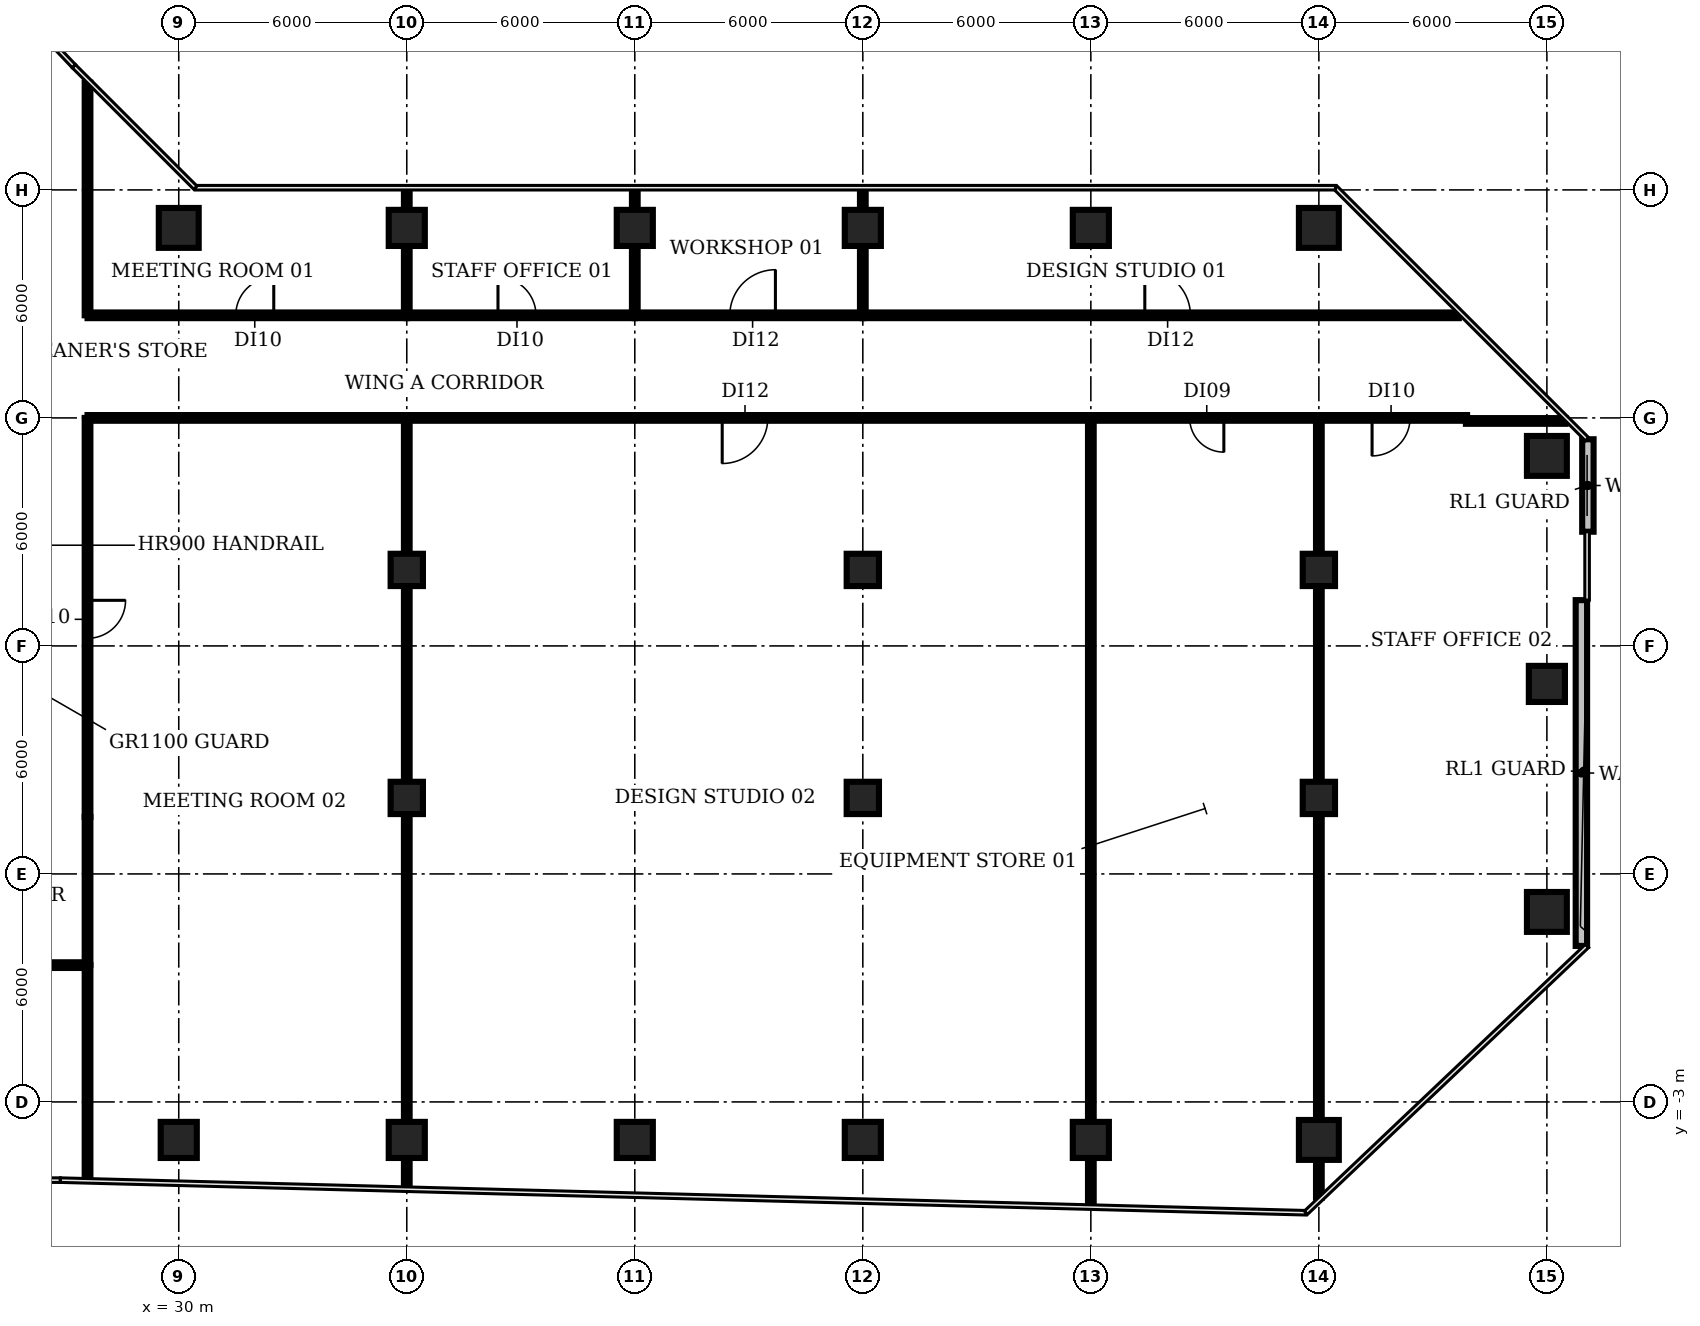
"""IFC4 building model, lengths in metres.
Left out: names, types, materials, properties, quantities, classifications, styles, units other than length and angle.
Written with IfcOpenShell. Run it as: python <this file> out.ifc"""

import sys

from ifc_helpers import new_model, si_unit, direction, frame, frame_2d, origin, origin_2d, place, context, subcontext, project, spatial, rectangle, circle, extrude, element, fill, save


model = new_model("IFC4")
c1 = context("Model", 3, precision=1e-05, world=origin(), true_north=direction((0.0, 1.0)))
c2 = subcontext(c1, "Body", "Model", "MODEL_VIEW")
j1 = project(units=[si_unit("LENGTHUNIT", "METRE"), si_unit("PLANEANGLEUNIT", "RADIAN")], contexts=[c1])
p1 = place(None, origin())
s1 = spatial("IfcSite", under=j1, at=p1, CompositionType="ELEMENT")
p2 = place(p1, origin())
s2 = spatial("IfcBuilding", under=s1, at=p2, CompositionType="ELEMENT")
p3 = place(p2, frame((0.0, 0.0, 45.8)))
s3 = spatial("IfcBuildingStorey", under=s2, at=p3, CompositionType="ELEMENT", Elevation=45.8)
p4 = place(p3, frame((30.0, -4.0, 0.0), z_axis=(0.0, 0.0, 1.0), x_axis=(1.0, 0.0, 0.0)))
e1 = element("IfcColumn", 1, at=p4, inside=s3, PredefinedType="COLUMN", context=c2, shape_type="SweptSolid", body=[
    extrude(rectangle(XDim=0.95, YDim=0.95, at=origin_2d()), origin(), (0.0, 0.0, 1.0), 3.85),
])
p5 = place(p3, frame((30.0, 20.0, 0.0), z_axis=(0.0, 0.0, 1.0), x_axis=(1.0, 0.0, 0.0)))
e2 = element("IfcColumn", 2, at=p5, inside=s3, PredefinedType="COLUMN", context=c2, shape_type="SweptSolid", body=[
    extrude(circle(Radius=0.525, at=origin_2d()), origin(), (0.0, 0.0, 1.0), 3.85),
])
p6 = place(p3, frame((36.0, -4.0, 0.0), z_axis=(0.0, 0.0, 1.0), x_axis=(1.0, 0.0, 0.0)))
e3 = element("IfcColumn", 3, at=p6, inside=s3, PredefinedType="COLUMN", context=c2, shape_type="SweptSolid", body=[
    extrude(rectangle(XDim=0.95, YDim=0.95, at=origin_2d()), origin(), (0.0, 0.0, 1.0), 3.85),
])
for number, where, z_axis, x_axis in (
    (4, (36.0, 5.0, 0.0), (0.0, 0.0, 1.0), (1.0, 0.0, 0.0)),
    (5, (36.0, 11.0, 0.0), (0.0, 0.0, 1.0), (1.0, 0.0, 0.0)),
):
    element("IfcColumn", number, at=place(p3, frame(where, z_axis=z_axis, x_axis=x_axis)), inside=s3, PredefinedType="COLUMN", context=c2, shape_type="SweptSolid", body=[
        extrude(rectangle(XDim=0.85, YDim=0.85, at=origin_2d()), origin(), (0.0, 0.0, 1.0), 3.85),
    ])
for number, where, z_axis, x_axis in (
    (6, (36.0, 20.0, 0.0), (0.0, 0.0, 1.0), (1.0, 0.0, 0.0)),
    (7, (42.0, -4.0, 0.0), (0.0, 0.0, 1.0), (1.0, 0.0, 0.0)),
    (8, (42.0, 20.0, 0.0), (0.0, 0.0, 1.0), (1.0, 0.0, 0.0)),
    (9, (48.0, -4.0, 0.0), (0.0, 0.0, 1.0), (1.0, 0.0, 0.0)),
):
    element("IfcColumn", number, at=place(p3, frame(where, z_axis=z_axis, x_axis=x_axis)), inside=s3, PredefinedType="COLUMN", context=c2, shape_type="SweptSolid", body=[
        extrude(rectangle(XDim=0.95, YDim=0.95, at=origin_2d()), origin(), (0.0, 0.0, 1.0), 3.85),
    ])
for number, where, z_axis, x_axis in (
    (10, (48.0, 5.0, 0.0), (0.0, 0.0, 1.0), (1.0, 0.0, 0.0)),
    (11, (48.0, 11.0, 0.0), (0.0, 0.0, 1.0), (1.0, 0.0, 0.0)),
):
    element("IfcColumn", number, at=place(p3, frame(where, z_axis=z_axis, x_axis=x_axis)), inside=s3, PredefinedType="COLUMN", context=c2, shape_type="SweptSolid", body=[
        extrude(rectangle(XDim=0.85, YDim=0.85, at=origin_2d()), origin(), (0.0, 0.0, 1.0), 3.85),
    ])
for number, where, z_axis, x_axis in (
    (12, (48.0, 20.0, 0.0), (0.0, 0.0, 1.0), (1.0, 0.0, 0.0)),
    (13, (54.0, -4.0, 0.0), (0.0, 0.0, 1.0), (1.0, 0.0, 0.0)),
    (14, (54.0, 20.0, 0.0), (0.0, 0.0, 1.0), (1.0, 0.0, 0.0)),
):
    element("IfcColumn", number, at=place(p3, frame(where, z_axis=z_axis, x_axis=x_axis)), inside=s3, PredefinedType="COLUMN", context=c2, shape_type="SweptSolid", body=[
        extrude(rectangle(XDim=0.95, YDim=0.95, at=origin_2d()), origin(), (0.0, 0.0, 1.0), 3.85),
    ])
p7 = place(p3, frame((60.0, -4.0, 0.0), z_axis=(0.0, 0.0, 1.0), x_axis=(1.0, 0.0, 0.0)))
e15 = element("IfcColumn", 15, at=p7, inside=s3, PredefinedType="COLUMN", context=c2, shape_type="SweptSolid", body=[
    extrude(circle(Radius=0.525, at=origin_2d()), origin(), (0.0, 0.0, 1.0), 3.85),
])
for number, where, z_axis, x_axis in (
    (16, (60.0, 5.0, 0.0), (0.0, 0.0, 1.0), (1.0, 0.0, 0.0)),
    (17, (60.0, 11.0, 0.0), (0.0, 0.0, 1.0), (1.0, 0.0, 0.0)),
):
    element("IfcColumn", number, at=place(p3, frame(where, z_axis=z_axis, x_axis=x_axis)), inside=s3, PredefinedType="COLUMN", context=c2, shape_type="SweptSolid", body=[
        extrude(rectangle(XDim=0.85, YDim=0.85, at=origin_2d()), origin(), (0.0, 0.0, 1.0), 3.85),
    ])
for number, where, z_axis, x_axis in (
    (18, (60.0, 20.0, 0.0), (0.0, 0.0, 1.0), (1.0, 0.0, 0.0)),
    (19, (66.0, 2.0, 0.0), (0.0, 0.0, 1.0), (1.0, 0.0, 0.0)),
):
    element("IfcColumn", number, at=place(p3, frame(where, z_axis=z_axis, x_axis=x_axis)), inside=s3, PredefinedType="COLUMN", context=c2, shape_type="SweptSolid", body=[
        extrude(circle(Radius=0.525, at=origin_2d()), origin(), (0.0, 0.0, 1.0), 3.85),
    ])
p8 = place(p3, frame((66.0, 8.0, 0.0), z_axis=(0.0, 0.0, 1.0), x_axis=(1.0, 0.0, 0.0)))
e20 = element("IfcColumn", 20, at=p8, inside=s3, PredefinedType="COLUMN", context=c2, shape_type="SweptSolid", body=[
    extrude(rectangle(XDim=0.95, YDim=0.95, at=origin_2d()), origin(), (0.0, 0.0, 1.0), 3.85),
])
p9 = place(p3, frame((66.0, 14.0, 0.0), z_axis=(0.0, 0.0, 1.0), x_axis=(1.0, 0.0, 0.0)))
e21 = element("IfcColumn", 21, at=p9, inside=s3, PredefinedType="COLUMN", context=c2, shape_type="SweptSolid", body=[
    extrude(circle(Radius=0.525, at=origin_2d()), origin(), (0.0, 0.0, 1.0), 3.85),
])
p10 = place(p3, frame((66.908, 1.105, 0.0), z_axis=(0.0, 0.0, 1.0), x_axis=(0.0, 1.0, 0.0)))
e22 = element("IfcWall", 22, at=p10, inside=s3, PredefinedType="SOLIDWALL", context=c2, shape_type="SweptSolid", body=[
    extrude(rectangle(XDim=9.1, YDim=0.3, at=frame_2d((4.55, 0.0))), origin(), (0.0, 0.0, 1.0), 3.85),
])
p11 = place(p3, frame((67.079, 12.005, 0.0), z_axis=(0.0, 0.0, 1.0), x_axis=(0.0, 1.0, 0.0)))
e23 = element("IfcWall", 23, at=p11, inside=s3, PredefinedType="SOLIDWALL", context=c2, shape_type="SweptSolid", body=[
    extrude(rectangle(XDim=2.433, YDim=0.3, at=frame_2d((1.217, 0.0))), origin(), (0.0, 0.0, 1.0), 3.85),
])
p12 = place(p3, frame((27.6, -5.01, 0.0), z_axis=(0.0, 0.0, 1.0), x_axis=(0.0, 1.0, 0.0)))
e24 = element("IfcWall", 24, at=p12, inside=s3, PredefinedType="PARTITIONING", context=c2, shape_type="SweptSolid", body=[
    extrude(rectangle(XDim=5.61, YDim=0.15, at=frame_2d((2.805, 0.0))), origin(), (0.0, 0.0, 1.0), 2.83),
])
p13 = place(p3, frame((27.6, 0.6, 0.0), z_axis=(0.0, 0.0, 1.0), x_axis=(-1.0, 0.0, 0.0)))
e25 = element("IfcWall", 25, at=p13, inside=s3, PredefinedType="PARTITIONING", context=c2, shape_type="SweptSolid", body=[
    extrude(rectangle(XDim=25.2, YDim=0.15, at=frame_2d((12.6, 0.0))), origin(), (0.0, 0.0, 1.0), 2.83),
])
p14 = place(p13, frame((12.1, 0.0, 0.0)))
e26 = element("IfcOpeningElement", 26, at=p14, cuts=e25, PredefinedType="OPENING", context=c2, shape_type="SweptSolid", body=[
    extrude(rectangle(XDim=1.2, YDim=2.1, at=frame_2d((0.6, 1.05))), frame((0.0, 0.085, 0.0), z_axis=(0.0, -1.0, 0.0), x_axis=(1.0, 0.0, 0.0)), (0.0, 0.0, 1.0), 0.17),
])
p15 = place(p3, frame((27.6, 0.6, 0.0), z_axis=(0.0, 0.0, 1.0), x_axis=(0.0, 1.0, 0.0)))
e27 = element("IfcWall", 27, at=p15, inside=s3, PredefinedType="PARTITIONING", context=c2, shape_type="SweptSolid", body=[
    extrude(rectangle(XDim=3.9, YDim=0.15, at=frame_2d((1.95, 0.0))), origin(), (0.0, 0.0, 1.0), 2.83),
])
p16 = place(p3, frame((27.6, 15.0, 0.0), z_axis=(0.0, 0.0, 1.0), x_axis=(0.0, -1.0, 0.0)))
e28 = element("IfcWall", 28, at=p16, inside=s3, PredefinedType="PARTITIONING", context=c2, shape_type="SweptSolid", body=[
    extrude(rectangle(XDim=10.5, YDim=0.15, at=frame_2d((5.25, 0.0))), origin(), (0.0, 0.0, 1.0), 2.83),
])
p17 = place(p16, frame((4.8, 0.0, 0.0)))
e29 = element("IfcOpeningElement", 29, at=p17, cuts=e28, PredefinedType="OPENING", context=c2, shape_type="SweptSolid", body=[
    extrude(rectangle(XDim=1.0, YDim=2.1, at=frame_2d((0.5, 1.05))), frame((0.0, 0.085, 0.0), z_axis=(0.0, -1.0, 0.0), x_axis=(1.0, 0.0, 0.0)), (0.0, 0.0, 1.0), 0.17),
])
p18 = place(p3, frame((27.6, 15.0, 0.0), z_axis=(0.0, 0.0, 1.0), x_axis=(1.0, 0.0, 0.0)))
e30 = element("IfcWall", 30, at=p18, inside=s3, PredefinedType="PARTITIONING", context=c2, shape_type="SweptSolid", body=[
    extrude(rectangle(XDim=8.4, YDim=0.15, at=frame_2d((4.2, 0.0))), origin(), (0.0, 0.0, 1.0), 2.83),
])
p19 = place(p3, frame((27.6, 17.7, 0.0), z_axis=(0.0, 0.0, 1.0), x_axis=(0.0, 1.0, 0.0)))
e31 = element("IfcWall", 31, at=p19, inside=s3, PredefinedType="PARTITIONING", context=c2, shape_type="SweptSolid", body=[
    extrude(rectangle(XDim=6.12, YDim=0.15, at=frame_2d((3.06, 0.0))), origin(), (0.0, 0.0, 1.0), 2.83),
])
p20 = place(p3, frame((27.6, 17.7, 0.0), z_axis=(0.0, 0.0, 1.0), x_axis=(1.0, 0.0, 0.0)))
e32 = element("IfcWall", 32, at=p20, inside=s3, PredefinedType="PARTITIONING", context=c2, shape_type="SweptSolid", body=[
    extrude(rectangle(XDim=8.4, YDim=0.15, at=frame_2d((4.2, 0.0))), origin(), (0.0, 0.0, 1.0), 2.83),
])
p21 = place(p20, frame((3.9, 0.0, 0.0)))
e33 = element("IfcOpeningElement", 33, at=p21, cuts=e32, PredefinedType="OPENING", context=c2, shape_type="SweptSolid", body=[
    extrude(rectangle(XDim=1.0, YDim=2.1, at=frame_2d((0.5, 1.05))), frame((0.0, 0.085, 0.0), z_axis=(0.0, -1.0, 0.0), x_axis=(1.0, 0.0, 0.0)), (0.0, 0.0, 1.0), 0.17),
])
p22 = place(p3, frame((36.0, -5.25, 0.0), z_axis=(0.0, 0.0, 1.0), x_axis=(0.0, 1.0, 0.0)))
e34 = element("IfcWall", 34, at=p22, inside=s3, PredefinedType="PARTITIONING", context=c2, shape_type="SweptSolid", body=[
    extrude(rectangle(XDim=20.25, YDim=0.15, at=frame_2d((10.125, 0.0))), origin(), (0.0, 0.0, 1.0), 2.83),
])
p23 = place(p3, frame((36.0, 17.7, 0.0), z_axis=(0.0, 0.0, 1.0), x_axis=(0.0, 1.0, 0.0)))
e35 = element("IfcWall", 35, at=p23, inside=s3, PredefinedType="PARTITIONING", context=c2, shape_type="SweptSolid", body=[
    extrude(rectangle(XDim=3.31, YDim=0.15, at=frame_2d((1.655, 0.0))), origin(), (0.0, 0.0, 1.0), 2.83),
])
p24 = place(p3, frame((36.0, 17.7, 0.0), z_axis=(0.0, 0.0, 1.0), x_axis=(1.0, 0.0, 0.0)))
e36 = element("IfcWall", 36, at=p24, inside=s3, PredefinedType="PARTITIONING", context=c2, shape_type="SweptSolid", body=[
    extrude(rectangle(XDim=6.0, YDim=0.15, at=frame_2d((3.0, 0.0))), origin(), (0.0, 0.0, 1.0), 2.83),
])
p25 = place(p24, frame((2.4, 0.0, 0.0)))
e37 = element("IfcOpeningElement", 37, at=p25, cuts=e36, PredefinedType="OPENING", context=c2, shape_type="SweptSolid", body=[
    extrude(rectangle(XDim=1.0, YDim=2.1, at=frame_2d((0.5, 1.05))), frame((0.0, 0.085, 0.0), z_axis=(0.0, -1.0, 0.0), x_axis=(1.0, 0.0, 0.0)), (0.0, 0.0, 1.0), 0.17),
])
p26 = place(p3, frame((42.0, 17.7, 0.0), z_axis=(0.0, 0.0, 1.0), x_axis=(0.0, 1.0, 0.0)))
e38 = element("IfcWall", 38, at=p26, inside=s3, PredefinedType="PARTITIONING", context=c2, shape_type="SweptSolid", body=[
    extrude(rectangle(XDim=3.31, YDim=0.15, at=frame_2d((1.655, 0.0))), origin(), (0.0, 0.0, 1.0), 2.83),
])
p27 = place(p3, frame((42.0, 17.7, 0.0), z_axis=(0.0, 0.0, 1.0), x_axis=(1.0, 0.0, 0.0)))
e39 = element("IfcWall", 39, at=p27, inside=s3, PredefinedType="PARTITIONING", context=c2, shape_type="SweptSolid", body=[
    extrude(rectangle(XDim=6.0, YDim=0.15, at=frame_2d((3.0, 0.0))), origin(), (0.0, 0.0, 1.0), 2.83),
])
p28 = place(p27, frame((2.5, 0.0, 0.0)))
e40 = element("IfcOpeningElement", 40, at=p28, cuts=e39, PredefinedType="OPENING", context=c2, shape_type="SweptSolid", body=[
    extrude(rectangle(XDim=1.2, YDim=2.1, at=frame_2d((0.6, 1.05))), frame((0.0, 0.085, 0.0), z_axis=(0.0, -1.0, 0.0), x_axis=(1.0, 0.0, 0.0)), (0.0, 0.0, 1.0), 0.17),
])
p29 = place(p3, frame((48.0, 17.7, 0.0), z_axis=(0.0, 0.0, 1.0), x_axis=(0.0, 1.0, 0.0)))
e41 = element("IfcWall", 41, at=p29, inside=s3, PredefinedType="PARTITIONING", context=c2, shape_type="SweptSolid", body=[
    extrude(rectangle(XDim=3.31, YDim=0.15, at=frame_2d((1.655, 0.0))), origin(), (0.0, 0.0, 1.0), 2.83),
])
p30 = place(p3, frame((48.0, 17.7, 0.0), z_axis=(0.0, 0.0, 1.0), x_axis=(1.0, 0.0, 0.0)))
e42 = element("IfcWall", 42, at=p30, inside=s3, PredefinedType="PARTITIONING", context=c2, shape_type="SweptSolid", body=[
    extrude(rectangle(XDim=15.683, YDim=0.15, at=frame_2d((7.842, 0.0))), origin(), (0.0, 0.0, 1.0), 2.83),
])
p31 = place(p30, frame((7.42, 0.0, 0.0)))
e43 = element("IfcOpeningElement", 43, at=p31, cuts=e42, PredefinedType="OPENING", context=c2, shape_type="SweptSolid", body=[
    extrude(rectangle(XDim=1.2, YDim=2.1, at=frame_2d((0.6, 1.05))), frame((0.0, 0.085, 0.0), z_axis=(0.0, -1.0, 0.0), x_axis=(1.0, 0.0, 0.0)), (0.0, 0.0, 1.0), 0.17),
])
p32 = place(p3, frame((54.0, -5.72, 0.0), z_axis=(0.0, 0.0, 1.0), x_axis=(0.0, 1.0, 0.0)))
e44 = element("IfcWall", 44, at=p32, inside=s3, PredefinedType="PARTITIONING", context=c2, shape_type="SweptSolid", body=[
    extrude(rectangle(XDim=20.72, YDim=0.15, at=frame_2d((10.36, 0.0))), origin(), (0.0, 0.0, 1.0), 2.83),
])
p33 = place(p3, frame((54.0, 15.0, 0.0), z_axis=(0.0, 0.0, 1.0), x_axis=(-1.0, 0.0, 0.0)))
e45 = element("IfcWall", 45, at=p33, inside=s3, PredefinedType="PARTITIONING", context=c2, shape_type="SweptSolid", body=[
    extrude(rectangle(XDim=18.0, YDim=0.15, at=frame_2d((9.0, 0.0))), origin(), (0.0, 0.0, 1.0), 2.83),
])
p34 = place(p33, frame((8.5, 0.0, 0.0)))
e46 = element("IfcOpeningElement", 46, at=p34, cuts=e45, PredefinedType="OPENING", context=c2, shape_type="SweptSolid", body=[
    extrude(rectangle(XDim=1.2, YDim=2.1, at=frame_2d((0.6, 1.05))), frame((0.0, 0.085, 0.0), z_axis=(0.0, -1.0, 0.0), x_axis=(1.0, 0.0, 0.0)), (0.0, 0.0, 1.0), 0.17),
])
p35 = place(p3, frame((60.0, -5.52, 0.0), z_axis=(0.0, 0.0, 1.0), x_axis=(0.0, 1.0, 0.0)))
e47 = element("IfcWall", 47, at=p35, inside=s3, PredefinedType="PARTITIONING", context=c2, shape_type="SweptSolid", body=[
    extrude(rectangle(XDim=20.52, YDim=0.15, at=frame_2d((10.26, 0.0))), origin(), (0.0, 0.0, 1.0), 2.83),
])
p36 = place(p3, frame((60.0, 15.0, 0.0), z_axis=(0.0, 0.0, 1.0), x_axis=(-1.0, 0.0, 0.0)))
e48 = element("IfcWall", 48, at=p36, inside=s3, PredefinedType="PARTITIONING", context=c2, shape_type="SweptSolid", body=[
    extrude(rectangle(XDim=6.0, YDim=0.15, at=frame_2d((3.0, 0.0))), origin(), (0.0, 0.0, 1.0), 2.83),
])
p37 = place(p36, frame((2.5, 0.0, 0.0)))
e49 = element("IfcOpeningElement", 49, at=p37, cuts=e48, PredefinedType="OPENING", context=c2, shape_type="SweptSolid", body=[
    extrude(rectangle(XDim=0.9, YDim=2.1, at=frame_2d((0.45, 1.05))), frame((0.0, 0.085, 0.0), z_axis=(0.0, -1.0, 0.0), x_axis=(1.0, 0.0, 0.0)), (0.0, 0.0, 1.0), 0.17),
])
p38 = place(p3, frame((63.87, 14.92, 0.0), z_axis=(0.0, 0.0, 1.0), x_axis=(1.0, 0.0, 0.0)))
e50 = element("IfcWall", 50, at=p38, inside=s3, PredefinedType="PARTITIONING", context=c2, shape_type="SweptSolid", body=[
    extrude(rectangle(XDim=2.621, YDim=0.15, at=frame_2d((1.311, 0.0))), origin(), (0.0, 0.0, 1.0), 2.83),
])
p39 = place(p3, frame((63.9, 15.0, 0.0), z_axis=(0.0, 0.0, 1.0), x_axis=(-1.0, 0.0, 0.0)))
e51 = element("IfcWall", 51, at=p39, inside=s3, PredefinedType="PARTITIONING", context=c2, shape_type="SweptSolid", body=[
    extrude(rectangle(XDim=3.9, YDim=0.15, at=frame_2d((1.95, 0.0))), origin(), (0.0, 0.0, 1.0), 2.83),
])
p40 = place(p39, frame((1.5, 0.0, 0.0)))
e52 = element("IfcOpeningElement", 52, at=p40, cuts=e51, PredefinedType="OPENING", context=c2, shape_type="SweptSolid", body=[
    extrude(rectangle(XDim=1.0, YDim=2.1, at=frame_2d((0.5, 1.05))), frame((0.0, 0.085, 0.0), z_axis=(0.0, -1.0, 0.0), x_axis=(1.0, 0.0, 0.0)), (0.0, 0.0, 1.0), 0.17),
])
p41 = place(p17, origin())
e53 = element("IfcDoor", 53, at=p41, inside=s3, OperationType="SINGLE_SWING_LEFT", PredefinedType="DOOR", context=c2, shape_type="SweptSolid", body=[
    extrude(rectangle(XDim=1.0, YDim=2.1, at=frame_2d((0.5, 1.05))), frame((0.0, 0.025, 0.0), z_axis=(0.0, -1.0, 0.0), x_axis=(1.0, 0.0, 0.0)), (0.0, 0.0, 1.0), 0.05),
])
fill(e29, e53)
p42 = place(p21, origin())
e54 = element("IfcDoor", 54, at=p42, inside=s3, OperationType="SINGLE_SWING_RIGHT", PredefinedType="DOOR", context=c2, shape_type="SweptSolid", body=[
    extrude(rectangle(XDim=1.0, YDim=2.1, at=frame_2d((0.5, 1.05))), frame((0.0, 0.025, 0.0), z_axis=(0.0, -1.0, 0.0), x_axis=(1.0, 0.0, 0.0)), (0.0, 0.0, 1.0), 0.05),
])
fill(e33, e54)
p43 = place(p25, origin())
e55 = element("IfcDoor", 55, at=p43, inside=s3, OperationType="SINGLE_SWING_LEFT", PredefinedType="DOOR", context=c2, shape_type="SweptSolid", body=[
    extrude(rectangle(XDim=1.0, YDim=2.1, at=frame_2d((0.5, 1.05))), frame((0.0, 0.025, 0.0), z_axis=(0.0, -1.0, 0.0), x_axis=(1.0, 0.0, 0.0)), (0.0, 0.0, 1.0), 0.05),
])
fill(e37, e55)
p44 = place(p28, origin())
e56 = element("IfcDoor", 56, at=p44, inside=s3, OperationType="SINGLE_SWING_RIGHT", PredefinedType="DOOR", context=c2, shape_type="SweptSolid", body=[
    extrude(rectangle(XDim=1.2, YDim=2.1, at=frame_2d((0.6, 1.05))), frame((0.0, 0.025, 0.0), z_axis=(0.0, -1.0, 0.0), x_axis=(1.0, 0.0, 0.0)), (0.0, 0.0, 1.0), 0.05),
])
fill(e40, e56)
p45 = place(p31, origin())
e57 = element("IfcDoor", 57, at=p45, inside=s3, OperationType="SINGLE_SWING_LEFT", PredefinedType="DOOR", context=c2, shape_type="SweptSolid", body=[
    extrude(rectangle(XDim=1.2, YDim=2.1, at=frame_2d((0.6, 1.05))), frame((0.0, 0.025, 0.0), z_axis=(0.0, -1.0, 0.0), x_axis=(1.0, 0.0, 0.0)), (0.0, 0.0, 1.0), 0.05),
])
fill(e43, e57)
p46 = place(p34, origin())
e58 = element("IfcDoor", 58, at=p46, inside=s3, OperationType="SINGLE_SWING_RIGHT", PredefinedType="DOOR", context=c2, shape_type="SweptSolid", body=[
    extrude(rectangle(XDim=1.2, YDim=2.1, at=frame_2d((0.6, 1.05))), frame((0.0, 0.025, 0.0), z_axis=(0.0, -1.0, 0.0), x_axis=(1.0, 0.0, 0.0)), (0.0, 0.0, 1.0), 0.05),
])
fill(e46, e58)
p47 = place(p37, origin())
e59 = element("IfcDoor", 59, at=p47, inside=s3, OperationType="SINGLE_SWING_LEFT", PredefinedType="DOOR", context=c2, shape_type="SweptSolid", body=[
    extrude(rectangle(XDim=0.9, YDim=2.1, at=frame_2d((0.45, 1.05))), frame((0.0, 0.025, 0.0), z_axis=(0.0, -1.0, 0.0), x_axis=(1.0, 0.0, 0.0)), (0.0, 0.0, 1.0), 0.05),
])
fill(e49, e59)
p48 = place(p40, origin())
e60 = element("IfcDoor", 60, at=p48, inside=s3, OperationType="SINGLE_SWING_RIGHT", PredefinedType="DOOR", context=c2, shape_type="SweptSolid", body=[
    extrude(rectangle(XDim=1.0, YDim=2.1, at=frame_2d((0.5, 1.05))), frame((0.0, 0.025, 0.0), z_axis=(0.0, -1.0, 0.0), x_axis=(1.0, 0.0, 0.0)), (0.0, 0.0, 1.0), 0.05),
])
fill(e52, e60)
save(model, sys.argv[1])
